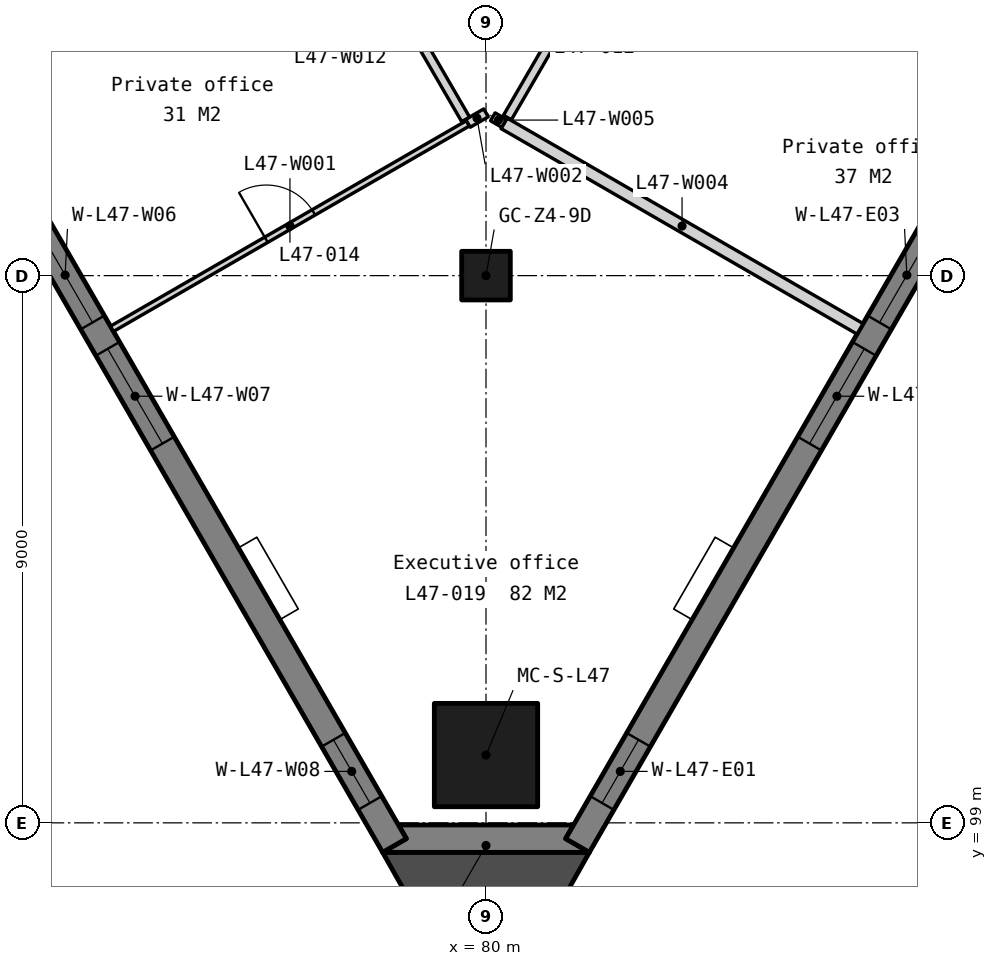
"""IFC4 building model, lengths in metres.
Left out: names, types, materials, properties, quantities, classifications, styles, units other than length and angle.
Written with IfcOpenShell. Run it as: python <this file> out.ifc"""

import sys

from ifc_helpers import new_model, si_unit, direction, frame, frame_2d, origin, origin_2d, place, context, subcontext, project, spatial, polyline, rectangle, outline, extrude, element, fill, save


model = new_model("IFC4")
c1 = context("Model", 3, precision=1e-05, world=origin(), true_north=direction((0.0, 1.0)))
c2 = subcontext(c1, "Body", "Model", "MODEL_VIEW")
j1 = project(units=[si_unit("LENGTHUNIT", "METRE"), si_unit("PLANEANGLEUNIT", "RADIAN")], contexts=[c1])
p1 = place(None, origin())
s1 = spatial("IfcSite", under=j1, at=p1, CompositionType="ELEMENT")
p2 = place(p1, origin())
s2 = spatial("IfcBuilding", under=s1, at=p2, CompositionType="ELEMENT")
p3 = place(p2, frame((0.0, 0.0, 188.0)))
s3 = spatial("IfcBuildingStorey", under=s2, at=p3, CompositionType="ELEMENT", Elevation=188.0)
p4 = place(p3, frame((80.0, 108.0, 0.0), z_axis=(0.0, 0.0, 1.0), x_axis=(1.0, 0.0, 0.0)))
e1 = element("IfcColumn", 1, at=p4, inside=s3, PredefinedType="COLUMN", context=c2, shape_type="SweptSolid", body=[
    extrude(rectangle(XDim=0.8, YDim=0.8, at=origin_2d()), origin(), (0.0, 0.0, 1.0), 3.9),
])
p5 = place(p3, frame((80.0, 100.115, 0.0), z_axis=(0.0, 0.0, 1.0), x_axis=(1.0, 0.0, 0.0)))
e2 = element("IfcColumn", 2, at=p5, inside=s3, PredefinedType="COLUMN", context=c2, shape_type="SweptSolid", body=[
    extrude(rectangle(XDim=1.7, YDim=1.7, at=origin_2d()), origin(), (0.0, 0.0, 1.0), 3.9),
])
p6 = place(p3, frame((0.0, 0.0, -0.15)))
e3 = element("IfcWall", 3, at=p6, inside=s3, PredefinedType="SOLIDWALL", context=c2, shape_type="SweptSolid", body=[
    extrude(outline(polyline([(78.3, 98.515), (78.69, 98.74), (78.56, 98.965), (81.44, 98.965), (81.31, 98.74), (81.7, 98.515), (78.3, 98.515)])), origin(), (0.0, 0.0, 1.0), 3.9),
])
p7 = place(p3, frame((59.13, 132.168, -0.15), z_axis=(0.0, 0.0, 1.0), x_axis=(0.500002199942, -0.866024133644, 0.0)))
e4 = element("IfcWall", 4, at=p7, inside=s3, PredefinedType="SOLIDWALL", context=c2, shape_type="SweptSolid", body=[
    extrude(outline(polyline([(38.729, 0.0), (38.729, 3.9), (0.0, 3.9), (0.0, 0.0), (38.729, 0.0)])), frame((0.0, 0.225, 0.0), z_axis=(0.0, -1.0, 0.0), x_axis=(1.0, 0.0, 0.0)), (0.0, 0.0, 1.0), 0.45),
])
p8 = place(p7, frame((0.807, 0.0, 0.95)))
e5 = element("IfcOpeningElement", 5, at=p8, cuts=e4, PredefinedType="OPENING", context=c2, shape_type="SweptSolid", body=[
    extrude(rectangle(XDim=1.2, YDim=2.2, at=frame_2d((0.6, 1.1))), frame((0.0, 0.235, 0.0), z_axis=(0.0, -1.0, 0.0), x_axis=(1.0, 0.0, 0.0)), (0.0, 0.0, 1.0), 0.47),
])
p9 = place(p7, frame((7.632, 0.0, 0.95)))
e6 = element("IfcOpeningElement", 6, at=p9, cuts=e4, PredefinedType="OPENING", context=c2, shape_type="SweptSolid", body=[
    extrude(rectangle(XDim=1.8, YDim=2.2, at=frame_2d((0.9, 1.1))), frame((0.0, 0.235, 0.0), z_axis=(0.0, -1.0, 0.0), x_axis=(1.0, 0.0, 0.0)), (0.0, 0.0, 1.0), 0.47),
])
p10 = place(p7, frame((9.932, 0.0, 0.95)))
e7 = element("IfcOpeningElement", 7, at=p10, cuts=e4, PredefinedType="OPENING", context=c2, shape_type="SweptSolid", body=[
    extrude(rectangle(XDim=1.8, YDim=2.2, at=frame_2d((0.9, 1.1))), frame((0.0, 0.235, 0.0), z_axis=(0.0, -1.0, 0.0), x_axis=(1.0, 0.0, 0.0)), (0.0, 0.0, 1.0), 0.47),
])
p11 = place(p7, frame((17.315, 0.0, 0.95)))
e8 = element("IfcOpeningElement", 8, at=p11, cuts=e4, PredefinedType="OPENING", context=c2, shape_type="SweptSolid", body=[
    extrude(rectangle(XDim=1.8, YDim=2.2, at=frame_2d((0.9, 1.1))), frame((0.0, 0.235, 0.0), z_axis=(0.0, -1.0, 0.0), x_axis=(1.0, 0.0, 0.0)), (0.0, 0.0, 1.0), 0.47),
])
p12 = place(p7, frame((19.615, 0.0, 0.95)))
e9 = element("IfcOpeningElement", 9, at=p12, cuts=e4, PredefinedType="OPENING", context=c2, shape_type="SweptSolid", body=[
    extrude(rectangle(XDim=1.8, YDim=2.2, at=frame_2d((0.9, 1.1))), frame((0.0, 0.235, 0.0), z_axis=(0.0, -1.0, 0.0), x_axis=(1.0, 0.0, 0.0)), (0.0, 0.0, 1.0), 0.47),
])
p13 = place(p7, frame((26.997, 0.0, 0.95)))
e10 = element("IfcOpeningElement", 10, at=p13, cuts=e4, PredefinedType="OPENING", context=c2, shape_type="SweptSolid", body=[
    extrude(rectangle(XDim=1.8, YDim=2.2, at=frame_2d((0.9, 1.1))), frame((0.0, 0.235, 0.0), z_axis=(0.0, -1.0, 0.0), x_axis=(1.0, 0.0, 0.0)), (0.0, 0.0, 1.0), 0.47),
])
p14 = place(p7, frame((29.297, 0.0, 0.95)))
e11 = element("IfcOpeningElement", 11, at=p14, cuts=e4, PredefinedType="OPENING", context=c2, shape_type="SweptSolid", body=[
    extrude(rectangle(XDim=1.8, YDim=2.2, at=frame_2d((0.9, 1.1))), frame((0.0, 0.235, 0.0), z_axis=(0.0, -1.0, 0.0), x_axis=(1.0, 0.0, 0.0)), (0.0, 0.0, 1.0), 0.47),
])
p15 = place(p7, frame((36.722, 0.0, 0.95)))
e12 = element("IfcOpeningElement", 12, at=p15, cuts=e4, PredefinedType="OPENING", context=c2, shape_type="SweptSolid", body=[
    extrude(rectangle(XDim=1.2, YDim=2.2, at=frame_2d((0.6, 1.1))), frame((0.0, 0.235, 0.0), z_axis=(0.0, -1.0, 0.0), x_axis=(1.0, 0.0, 0.0)), (0.0, 0.0, 1.0), 0.47),
])
p16 = place(p3, frame((81.505, 98.627, -0.15), z_axis=(0.0, 0.0, 1.0), x_axis=(0.500002199942, 0.866024133644, 0.0)))
e13 = element("IfcWall", 13, at=p16, inside=s3, PredefinedType="SOLIDWALL", context=c2, shape_type="SweptSolid", body=[
    extrude(outline(polyline([(38.729, 0.0), (38.729, 3.9), (0.0, 3.9), (0.0, 0.0), (38.729, 0.0)])), frame((0.0, 0.225, 0.0), z_axis=(0.0, -1.0, 0.0), x_axis=(1.0, 0.0, 0.0)), (0.0, 0.0, 1.0), 0.45),
])
p17 = place(p16, frame((0.807, 0.0, 0.95)))
e14 = element("IfcOpeningElement", 14, at=p17, cuts=e13, PredefinedType="OPENING", context=c2, shape_type="SweptSolid", body=[
    extrude(rectangle(XDim=1.2, YDim=2.2, at=frame_2d((0.6, 1.1))), frame((0.0, 0.235, 0.0), z_axis=(0.0, -1.0, 0.0), x_axis=(1.0, 0.0, 0.0)), (0.0, 0.0, 1.0), 0.47),
])
p18 = place(p16, frame((7.632, 0.0, 0.95)))
e15 = element("IfcOpeningElement", 15, at=p18, cuts=e13, PredefinedType="OPENING", context=c2, shape_type="SweptSolid", body=[
    extrude(rectangle(XDim=1.8, YDim=2.2, at=frame_2d((0.9, 1.1))), frame((0.0, 0.235, 0.0), z_axis=(0.0, -1.0, 0.0), x_axis=(1.0, 0.0, 0.0)), (0.0, 0.0, 1.0), 0.47),
])
p19 = place(p16, frame((9.932, 0.0, 0.95)))
e16 = element("IfcOpeningElement", 16, at=p19, cuts=e13, PredefinedType="OPENING", context=c2, shape_type="SweptSolid", body=[
    extrude(rectangle(XDim=1.8, YDim=2.2, at=frame_2d((0.9, 1.1))), frame((0.0, 0.235, 0.0), z_axis=(0.0, -1.0, 0.0), x_axis=(1.0, 0.0, 0.0)), (0.0, 0.0, 1.0), 0.47),
])
p20 = place(p16, frame((17.315, 0.0, 0.95)))
e17 = element("IfcOpeningElement", 17, at=p20, cuts=e13, PredefinedType="OPENING", context=c2, shape_type="SweptSolid", body=[
    extrude(rectangle(XDim=1.8, YDim=2.2, at=frame_2d((0.9, 1.1))), frame((0.0, 0.235, 0.0), z_axis=(0.0, -1.0, 0.0), x_axis=(1.0, 0.0, 0.0)), (0.0, 0.0, 1.0), 0.47),
])
p21 = place(p16, frame((19.615, 0.0, 0.95)))
e18 = element("IfcOpeningElement", 18, at=p21, cuts=e13, PredefinedType="OPENING", context=c2, shape_type="SweptSolid", body=[
    extrude(rectangle(XDim=1.8, YDim=2.2, at=frame_2d((0.9, 1.1))), frame((0.0, 0.235, 0.0), z_axis=(0.0, -1.0, 0.0), x_axis=(1.0, 0.0, 0.0)), (0.0, 0.0, 1.0), 0.47),
])
p22 = place(p16, frame((26.997, 0.0, 0.95)))
e19 = element("IfcOpeningElement", 19, at=p22, cuts=e13, PredefinedType="OPENING", context=c2, shape_type="SweptSolid", body=[
    extrude(rectangle(XDim=1.8, YDim=2.2, at=frame_2d((0.9, 1.1))), frame((0.0, 0.235, 0.0), z_axis=(0.0, -1.0, 0.0), x_axis=(1.0, 0.0, 0.0)), (0.0, 0.0, 1.0), 0.47),
])
p23 = place(p16, frame((29.297, 0.0, 0.95)))
e20 = element("IfcOpeningElement", 20, at=p23, cuts=e13, PredefinedType="OPENING", context=c2, shape_type="SweptSolid", body=[
    extrude(rectangle(XDim=1.8, YDim=2.2, at=frame_2d((0.9, 1.1))), frame((0.0, 0.235, 0.0), z_axis=(0.0, -1.0, 0.0), x_axis=(1.0, 0.0, 0.0)), (0.0, 0.0, 1.0), 0.47),
])
p24 = place(p16, frame((36.722, 0.0, 0.95)))
e21 = element("IfcOpeningElement", 21, at=p24, cuts=e13, PredefinedType="OPENING", context=c2, shape_type="SweptSolid", body=[
    extrude(rectangle(XDim=1.2, YDim=2.2, at=frame_2d((0.6, 1.1))), frame((0.0, 0.235, 0.0), z_axis=(0.0, -1.0, 0.0), x_axis=(1.0, 0.0, 0.0)), (0.0, 0.0, 1.0), 0.47),
])
p25 = place(p3, frame((0.0, 0.0, -0.15)))
e22 = element("IfcWall", 22, at=p25, inside=s3, PredefinedType="SOLIDWALL", context=c2, shape_type="SweptSolid", body=[
    extrude(outline(polyline([(78.3, 98.515), (80.0, 95.511), (81.7, 98.515), (78.3, 98.515)])), origin(), (0.0, 0.0, 1.0), 3.9),
])
p26 = place(p3, frame((73.849, 107.125, 0.0), z_axis=(0.0, 0.0, 1.0), x_axis=(0.866029815523, 0.499992358568, 0.0)))
e23 = element("IfcWall", 23, at=p26, inside=s3, PredefinedType="PARTITIONING", context=c2, shape_type="SweptSolid", body=[
    extrude(rectangle(XDim=6.76, YDim=0.1, at=frame_2d((3.38, 0.0))), origin(), (0.0, 0.0, 1.0), 3.75),
])
p27 = place(p26, frame((2.93, 0.0, 0.0)))
e24 = element("IfcOpeningElement", 24, at=p27, cuts=e23, PredefinedType="OPENING", context=c2, shape_type="SweptSolid", body=[
    extrude(rectangle(XDim=0.9, YDim=2.1, at=frame_2d((0.45, 1.05))), frame((0.0, 0.06, 0.0), z_axis=(0.0, -1.0, 0.0), x_axis=(1.0, 0.0, 0.0)), (0.0, 0.0, 1.0), 0.12),
])
p28 = place(p3, frame((79.703, 110.505, 0.0), z_axis=(0.0, 0.0, 1.0), x_axis=(0.865913012852, 0.500194616298, 0.0)))
e25 = element("IfcWall", 25, at=p28, inside=s3, PredefinedType="PARTITIONING", context=c2, shape_type="SweptSolid", body=[
    extrude(rectangle(XDim=0.343, YDim=0.15, at=frame_2d((0.171, 0.0))), origin(), (0.0, 0.0, 1.0), 3.75),
])
p29 = place(p3, frame((77.274, 114.693, 0.0), z_axis=(0.0, 0.0, 1.0), x_axis=(0.501799348286, -0.864984054223, 0.0)))
e26 = element("IfcWall", 26, at=p29, inside=s3, PredefinedType="PARTITIONING", context=c2, shape_type="SweptSolid", body=[
    extrude(rectangle(XDim=4.766, YDim=0.15, at=frame_2d((2.383, 0.0))), origin(), (0.0, 0.0, 1.0), 3.75),
])
p30 = place(p29, frame((1.883, 0.0, 0.0)))
e27 = element("IfcOpeningElement", 27, at=p30, cuts=e26, PredefinedType="OPENING", context=c2, shape_type="SweptSolid", body=[
    extrude(rectangle(XDim=1.0, YDim=2.1, at=frame_2d((0.5, 1.05))), frame((0.0, 0.085, 0.0), z_axis=(0.0, -1.0, 0.0), x_axis=(1.0, 0.0, 0.0)), (0.0, 0.0, 1.0), 0.17),
])
p31 = place(p3, frame((80.297, 110.505, 0.0), z_axis=(0.0, 0.0, 1.0), x_axis=(0.866029815523, -0.499992358568, 0.0)))
e28 = element("IfcWall", 28, at=p31, inside=s3, PredefinedType="PARTITIONING", context=c2, shape_type="SweptSolid", body=[
    extrude(rectangle(XDim=6.76, YDim=0.2, at=frame_2d((3.38, 0.0))), origin(), (0.0, 0.0, 1.0), 3.75),
])
p32 = place(p3, frame((80.113, 110.612, 0.0), z_axis=(0.0, 0.0, 1.0), x_axis=(0.865765842911, -0.500449303376, 0.0)))
e29 = element("IfcWall", 29, at=p32, inside=s3, PredefinedType="PARTITIONING", context=c2, shape_type="SweptSolid", body=[
    extrude(rectangle(XDim=0.213, YDim=0.15, at=frame_2d((0.106, 0.0))), origin(), (0.0, 0.0, 1.0), 3.75),
])
p33 = place(p3, frame((71.428, 111.318, 0.0), z_axis=(0.0, 0.0, 1.0), x_axis=(0.866020884234, 0.500007828009, 0.0)))
e30 = element("IfcWall", 30, at=p33, inside=s3, PredefinedType="PARTITIONING", context=c2, shape_type="SweptSolid", body=[
    extrude(rectangle(XDim=6.665, YDim=0.2, at=frame_2d((3.333, 0.0))), origin(), (0.0, 0.0, 1.0), 3.75),
])
p34 = place(p3, frame((80.352, 110.6, 0.0), z_axis=(0.0, 0.0, 1.0), x_axis=(0.502155861577, 0.864777133534, 0.0)))
e31 = element("IfcWall", 31, at=p34, inside=s3, PredefinedType="PARTITIONING", context=c2, shape_type="SweptSolid", body=[
    extrude(rectangle(XDim=3.764, YDim=0.15, at=frame_2d((1.882, 0.0))), origin(), (0.0, 0.0, 1.0), 3.75),
])
p35 = place(p34, frame((1.382, 0.0, 0.0)))
e32 = element("IfcOpeningElement", 32, at=p35, cuts=e31, PredefinedType="OPENING", context=c2, shape_type="SweptSolid", body=[
    extrude(rectangle(XDim=1.0, YDim=2.1, at=frame_2d((0.5, 1.05))), frame((0.0, 0.085, 0.0), z_axis=(0.0, -1.0, 0.0), x_axis=(1.0, 0.0, 0.0)), (0.0, 0.0, 1.0), 0.17),
])
p36 = place(p13, origin())
e33 = element("IfcWindow", 33, at=p36, inside=s3, PartitioningType="SINGLE_PANEL", PredefinedType="WINDOW", context=c2, shape_type="SweptSolid", body=[
    extrude(rectangle(XDim=1.8, YDim=2.2, at=frame_2d((0.9, 1.1))), frame((0.0, 0.03, 0.0), z_axis=(0.0, -1.0, 0.0), x_axis=(1.0, 0.0, 0.0)), (0.0, 0.0, 1.0), 0.06),
])
fill(e10, e33)
p37 = place(p14, origin())
e34 = element("IfcWindow", 34, at=p37, inside=s3, PartitioningType="SINGLE_PANEL", PredefinedType="WINDOW", context=c2, shape_type="SweptSolid", body=[
    extrude(rectangle(XDim=1.8, YDim=2.2, at=frame_2d((0.9, 1.1))), frame((0.0, 0.03, 0.0), z_axis=(0.0, -1.0, 0.0), x_axis=(1.0, 0.0, 0.0)), (0.0, 0.0, 1.0), 0.06),
])
fill(e11, e34)
p38 = place(p15, origin())
e35 = element("IfcWindow", 35, at=p38, inside=s3, PartitioningType="SINGLE_PANEL", PredefinedType="WINDOW", context=c2, shape_type="SweptSolid", body=[
    extrude(rectangle(XDim=1.2, YDim=2.2, at=frame_2d((0.6, 1.1))), frame((0.0, 0.03, 0.0), z_axis=(0.0, -1.0, 0.0), x_axis=(1.0, 0.0, 0.0)), (0.0, 0.0, 1.0), 0.06),
])
fill(e12, e35)
p39 = place(p17, origin())
e36 = element("IfcWindow", 36, at=p39, inside=s3, PartitioningType="SINGLE_PANEL", PredefinedType="WINDOW", context=c2, shape_type="SweptSolid", body=[
    extrude(rectangle(XDim=1.2, YDim=2.2, at=frame_2d((0.6, 1.1))), frame((0.0, 0.03, 0.0), z_axis=(0.0, -1.0, 0.0), x_axis=(1.0, 0.0, 0.0)), (0.0, 0.0, 1.0), 0.06),
])
fill(e14, e36)
p40 = place(p18, origin())
e37 = element("IfcWindow", 37, at=p40, inside=s3, PartitioningType="SINGLE_PANEL", PredefinedType="WINDOW", context=c2, shape_type="SweptSolid", body=[
    extrude(rectangle(XDim=1.8, YDim=2.2, at=frame_2d((0.9, 1.1))), frame((0.0, 0.03, 0.0), z_axis=(0.0, -1.0, 0.0), x_axis=(1.0, 0.0, 0.0)), (0.0, 0.0, 1.0), 0.06),
])
fill(e15, e37)
p41 = place(p19, origin())
e38 = element("IfcWindow", 38, at=p41, inside=s3, PartitioningType="SINGLE_PANEL", PredefinedType="WINDOW", context=c2, shape_type="SweptSolid", body=[
    extrude(rectangle(XDim=1.8, YDim=2.2, at=frame_2d((0.9, 1.1))), frame((0.0, 0.03, 0.0), z_axis=(0.0, -1.0, 0.0), x_axis=(1.0, 0.0, 0.0)), (0.0, 0.0, 1.0), 0.06),
])
fill(e16, e38)
p42 = place(p27, origin())
e39 = element("IfcDoor", 39, at=p42, inside=s3, OperationType="SINGLE_SWING_LEFT", PredefinedType="DOOR", context=c2, shape_type="SweptSolid", body=[
    extrude(rectangle(XDim=0.9, YDim=2.1, at=frame_2d((0.45, 1.05))), frame((0.0, 0.025, 0.0), z_axis=(0.0, -1.0, 0.0), x_axis=(1.0, 0.0, 0.0)), (0.0, 0.0, 1.0), 0.05),
])
fill(e24, e39)
save(model, sys.argv[1])
